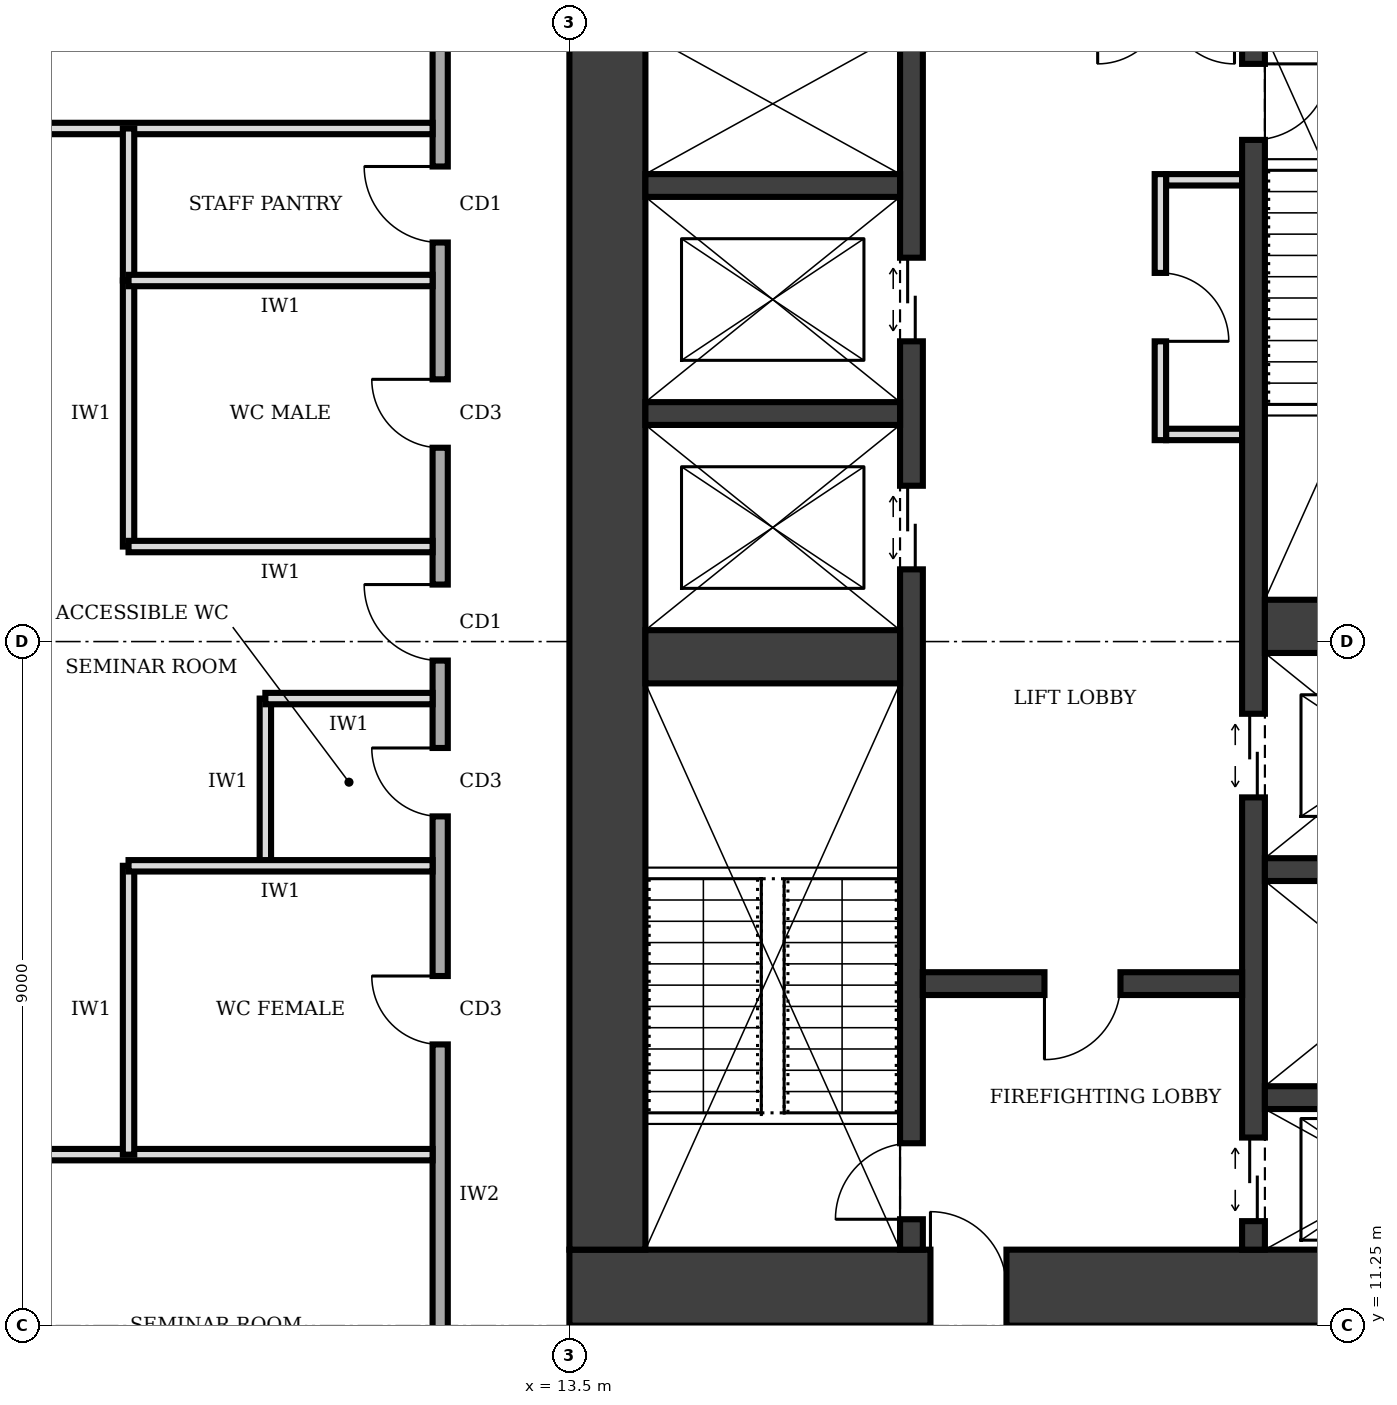
"""IFC4 building model, lengths in metres.
Left out: names, types, materials, properties, quantities, classifications, styles, units other than length and angle.
Written with IfcOpenShell. Run it as: python <this file> out.ifc"""

import sys

from ifc_helpers import new_model, si_unit, direction, frame, frame_2d, origin, place, context, subcontext, project, spatial, rectangle, extrude, element, fill, save


model = new_model("IFC4")
c1 = context("Model", 3, precision=1e-05, world=origin(), true_north=direction((0.0, 1.0)))
c2 = subcontext(c1, "Body", "Model", "MODEL_VIEW")
j1 = project(units=[si_unit("LENGTHUNIT", "METRE"), si_unit("PLANEANGLEUNIT", "RADIAN")], contexts=[c1])
p1 = place(None, origin())
s1 = spatial("IfcSite", under=j1, at=p1, CompositionType="ELEMENT")
p2 = place(p1, origin())
s2 = spatial("IfcBuilding", under=s1, at=p2, CompositionType="ELEMENT")
p3 = place(p2, frame((0.0, 0.0, 33.0)))
s3 = spatial("IfcBuildingStorey", under=s2, at=p3, CompositionType="ELEMENT", Elevation=33.0)
p4 = place(p3, frame((13.5, 11.75, 0.0), z_axis=(0.0, 0.0, 1.0), x_axis=(1.0, 0.0, 0.0)))
e1 = element("IfcWall", 1, at=p4, inside=s3, PredefinedType="SHEAR", context=c2, shape_type="SweptSolid", body=[
    extrude(rectangle(XDim=13.5, YDim=1.0, at=frame_2d((6.75, 0.0))), origin(), (0.0, 0.0, 1.0), 4.0),
])
p5 = place(p4, frame((4.75, 0.0, 0.0)))
e2 = element("IfcOpeningElement", 2, at=p5, cuts=e1, PredefinedType="OPENING", context=c2, shape_type="SweptSolid", body=[
    extrude(rectangle(XDim=1.0, YDim=2.1, at=frame_2d((0.5, 1.05))), frame((0.0, 0.51, 0.0), z_axis=(0.0, -1.0, 0.0), x_axis=(1.0, 0.0, 0.0)), (0.0, 0.0, 1.0), 1.02),
])
p6 = place(p3, frame((14.0, 28.25, 0.0), z_axis=(0.0, 0.0, 1.0), x_axis=(0.0, -1.0, 0.0)))
e3 = element("IfcWall", 3, at=p6, inside=s3, PredefinedType="SHEAR", context=c2, shape_type="SweptSolid", body=[
    extrude(rectangle(XDim=16.0, YDim=1.0, at=frame_2d((8.0, 0.0))), origin(), (0.0, 0.0, 1.0), 4.0),
])
p7 = place(p3, frame((18.0, 12.25, 0.0), z_axis=(0.0, 0.0, 1.0), x_axis=(0.0, 1.0, 0.0)))
e4 = element("IfcWall", 4, at=p7, inside=s3, PredefinedType="SHEAR", context=c2, shape_type="SweptSolid", body=[
    extrude(rectangle(XDim=16.0, YDim=0.3, at=frame_2d((8.0, 0.0))), origin(), (0.0, 0.0, 1.0), 4.0),
])
p8 = place(p7, frame((0.4, 0.0, 0.0)))
e5 = element("IfcOpeningElement", 5, at=p8, cuts=e4, PredefinedType="OPENING", context=c2, shape_type="SweptSolid", body=[
    extrude(rectangle(XDim=1.0, YDim=2.1, at=frame_2d((0.5, 1.05))), frame((0.0, 0.16, 0.0), z_axis=(0.0, -1.0, 0.0), x_axis=(1.0, 0.0, 0.0)), (0.0, 0.0, 1.0), 0.32),
])
p9 = place(p7, frame((8.95, 0.0, 0.0)))
e6 = element("IfcOpeningElement", 6, at=p9, cuts=e4, PredefinedType="OPENING", context=c2, shape_type="SweptSolid", body=[
    extrude(rectangle(XDim=1.1, YDim=2.1, at=frame_2d((0.55, 1.05))), frame((0.0, 0.16, 0.0), z_axis=(0.0, -1.0, 0.0), x_axis=(1.0, 0.0, 0.0)), (0.0, 0.0, 1.0), 0.32),
])
p10 = place(p7, frame((11.95, 0.0, 0.0)))
e7 = element("IfcOpeningElement", 7, at=p10, cuts=e4, PredefinedType="OPENING", context=c2, shape_type="SweptSolid", body=[
    extrude(rectangle(XDim=1.1, YDim=2.1, at=frame_2d((0.55, 1.05))), frame((0.0, 0.16, 0.0), z_axis=(0.0, -1.0, 0.0), x_axis=(1.0, 0.0, 0.0)), (0.0, 0.0, 1.0), 0.32),
])
p11 = place(p3, frame((22.5, 12.25, 0.0), z_axis=(0.0, 0.0, 1.0), x_axis=(0.0, 1.0, 0.0)))
e8 = element("IfcWall", 8, at=p11, inside=s3, PredefinedType="SHEAR", context=c2, shape_type="SweptSolid", body=[
    extrude(rectangle(XDim=16.0, YDim=0.3, at=frame_2d((8.0, 0.0))), origin(), (0.0, 0.0, 1.0), 4.0),
])
p12 = place(p11, frame((14.6, 0.0, 0.0)))
e9 = element("IfcOpeningElement", 9, at=p12, cuts=e8, PredefinedType="OPENING", context=c2, shape_type="SweptSolid", body=[
    extrude(rectangle(XDim=1.0, YDim=2.1, at=frame_2d((0.5, 1.05))), frame((0.0, 0.16, 0.0), z_axis=(0.0, -1.0, 0.0), x_axis=(1.0, 0.0, 0.0)), (0.0, 0.0, 1.0), 0.32),
])
p13 = place(p11, frame((0.375, 0.0, 0.0)))
e10 = element("IfcOpeningElement", 10, at=p13, cuts=e8, PredefinedType="OPENING", context=c2, shape_type="SweptSolid", body=[
    extrude(rectangle(XDim=1.1, YDim=2.1, at=frame_2d((0.55, 1.05))), frame((0.0, 0.16, 0.0), z_axis=(0.0, -1.0, 0.0), x_axis=(1.0, 0.0, 0.0)), (0.0, 0.0, 1.0), 0.32),
])
p14 = place(p11, frame((5.95, 0.0, 0.0)))
e11 = element("IfcOpeningElement", 11, at=p14, cuts=e8, PredefinedType="OPENING", context=c2, shape_type="SweptSolid", body=[
    extrude(rectangle(XDim=1.1, YDim=2.1, at=frame_2d((0.55, 1.05))), frame((0.0, 0.16, 0.0), z_axis=(0.0, -1.0, 0.0), x_axis=(1.0, 0.0, 0.0)), (0.0, 0.0, 1.0), 0.32),
])
p15 = place(p3, frame((14.5, 20.05, 0.0), z_axis=(0.0, 0.0, 1.0), x_axis=(1.0, 0.0, 0.0)))
e12 = element("IfcWall", 12, at=p15, inside=s3, PredefinedType="SHEAR", context=c2, shape_type="SweptSolid", body=[
    extrude(rectangle(XDim=3.35, YDim=0.7, at=frame_2d((1.675, 0.0))), origin(), (0.0, 0.0, 1.0), 4.0),
])
p16 = place(p3, frame((18.15, 15.75, 0.0), z_axis=(0.0, 0.0, 1.0), x_axis=(1.0, 0.0, 0.0)))
e13 = element("IfcWall", 13, at=p16, inside=s3, PredefinedType="SHEAR", context=c2, shape_type="SweptSolid", body=[
    extrude(rectangle(XDim=4.2, YDim=0.3, at=frame_2d((2.1, 0.0))), origin(), (0.0, 0.0, 1.0), 4.0),
])
p17 = place(p16, frame((1.6, 0.0, 0.0)))
e14 = element("IfcOpeningElement", 14, at=p17, cuts=e13, PredefinedType="OPENING", context=c2, shape_type="SweptSolid", body=[
    extrude(rectangle(XDim=1.0, YDim=2.1, at=frame_2d((0.5, 1.05))), frame((0.0, 0.16, 0.0), z_axis=(0.0, -1.0, 0.0), x_axis=(1.0, 0.0, 0.0)), (0.0, 0.0, 1.0), 0.32),
])
for number, where, z_axis, x_axis in (
    (15, (22.65, 14.25, 0.0), (0.0, 0.0, 1.0), (1.0, 0.0, 0.0)),
    (16, (22.65, 17.25, 0.0), (0.0, 0.0, 1.0), (1.0, 0.0, 0.0)),
):
    element("IfcWall", number, at=place(p3, frame(where, z_axis=z_axis, x_axis=x_axis)), inside=s3, PredefinedType="SHEAR", context=c2, shape_type="SweptSolid", body=[
        extrude(rectangle(XDim=3.35, YDim=0.3, at=frame_2d((1.675, 0.0))), origin(), (0.0, 0.0, 1.0), 4.0),
    ])
p18 = place(p3, frame((22.65, 20.45, 0.0), z_axis=(0.0, 0.0, 1.0), x_axis=(1.0, 0.0, 0.0)))
e17 = element("IfcWall", 17, at=p18, inside=s3, PredefinedType="SHEAR", context=c2, shape_type="SweptSolid", body=[
    extrude(rectangle(XDim=3.35, YDim=0.7, at=frame_2d((1.675, 0.0))), origin(), (0.0, 0.0, 1.0), 4.0),
])
for number, where, z_axis, x_axis in (
    (18, (14.5, 23.25, 0.0), (0.0, 0.0, 1.0), (1.0, 0.0, 0.0)),
    (19, (14.5, 26.25, 0.0), (0.0, 0.0, 1.0), (1.0, 0.0, 0.0)),
):
    element("IfcWall", number, at=place(p3, frame(where, z_axis=z_axis, x_axis=x_axis)), inside=s3, PredefinedType="SHEAR", context=c2, shape_type="SweptSolid", body=[
        extrude(rectangle(XDim=3.35, YDim=0.3, at=frame_2d((1.675, 0.0))), origin(), (0.0, 0.0, 1.0), 4.0),
    ])
p19 = place(p3, frame((21.275, 22.9, 0.0), z_axis=(0.0, 0.0, 1.0), x_axis=(0.0, 1.0, 0.0)))
e20 = element("IfcWall", 20, at=p19, inside=s3, PredefinedType="PARTITIONING", context=c2, shape_type="SweptSolid", body=[
    extrude(rectangle(XDim=3.5, YDim=0.15, at=frame_2d((1.75, 0.0))), origin(), (0.0, 0.0, 1.0), 3.75),
])
p20 = place(p19, frame((1.3, 0.0, 0.0)))
e21 = element("IfcOpeningElement", 21, at=p20, cuts=e20, PredefinedType="OPENING", context=c2, shape_type="SweptSolid", body=[
    extrude(rectangle(XDim=0.9, YDim=2.1, at=frame_2d((0.45, 1.05))), frame((0.0, 0.085, 0.0), z_axis=(0.0, -1.0, 0.0), x_axis=(1.0, 0.0, 0.0)), (0.0, 0.0, 1.0), 0.17),
])
for number, where, z_axis, x_axis in (
    (22, (21.35, 22.975, 0.0), (0.0, 0.0, 1.0), (1.0, 0.0, 0.0)),
    (23, (21.35, 26.325, 0.0), (0.0, 0.0, 1.0), (1.0, 0.0, 0.0)),
):
    element("IfcWall", number, at=place(p3, frame(where, z_axis=z_axis, x_axis=x_axis)), inside=s3, PredefinedType="PARTITIONING", context=c2, shape_type="SweptSolid", body=[
        extrude(rectangle(XDim=1.0, YDim=0.15, at=frame_2d((0.5, 0.0))), origin(), (0.0, 0.0, 1.0), 3.75),
    ])
p21 = place(p3, frame((11.8, 31.3, 0.0), z_axis=(0.0, 0.0, 1.0), x_axis=(0.0, -1.0, 0.0)))
e24 = element("IfcWall", 24, at=p21, inside=s3, PredefinedType="SOLIDWALL", context=c2, shape_type="SweptSolid", body=[
    extrude(rectangle(XDim=23.8, YDim=0.2, at=frame_2d((11.9, 0.0))), origin(), (0.0, 0.0, 1.0), 3.75),
])
p22 = place(p21, frame((20.3, 0.0, 0.0)))
e25 = element("IfcOpeningElement", 25, at=p22, cuts=e24, PredefinedType="OPENING", context=c2, shape_type="SweptSolid", body=[
    extrude(rectangle(XDim=1.0, YDim=2.1, at=frame_2d((0.5, 1.05))), frame((0.0, 0.11, 0.0), z_axis=(0.0, -1.0, 0.0), x_axis=(1.0, 0.0, 0.0)), (0.0, 0.0, 1.0), 0.22),
])
p23 = place(p21, frame((15.45, 0.0, 0.0)))
e26 = element("IfcOpeningElement", 26, at=p23, cuts=e24, PredefinedType="OPENING", context=c2, shape_type="SweptSolid", body=[
    extrude(rectangle(XDim=0.9, YDim=2.1, at=frame_2d((0.45, 1.05))), frame((0.0, 0.11, 0.0), z_axis=(0.0, -1.0, 0.0), x_axis=(1.0, 0.0, 0.0)), (0.0, 0.0, 1.0), 0.22),
])
p24 = place(p21, frame((12.45, 0.0, 0.0)))
e27 = element("IfcOpeningElement", 27, at=p24, cuts=e24, PredefinedType="OPENING", context=c2, shape_type="SweptSolid", body=[
    extrude(rectangle(XDim=0.9, YDim=2.1, at=frame_2d((0.45, 1.05))), frame((0.0, 0.11, 0.0), z_axis=(0.0, -1.0, 0.0), x_axis=(1.0, 0.0, 0.0)), (0.0, 0.0, 1.0), 0.22),
])
p25 = place(p21, frame((7.6, 0.0, 0.0)))
e28 = element("IfcOpeningElement", 28, at=p25, cuts=e24, PredefinedType="OPENING", context=c2, shape_type="SweptSolid", body=[
    extrude(rectangle(XDim=0.9, YDim=2.1, at=frame_2d((0.45, 1.05))), frame((0.0, 0.11, 0.0), z_axis=(0.0, -1.0, 0.0), x_axis=(1.0, 0.0, 0.0)), (0.0, 0.0, 1.0), 0.22),
])
p26 = place(p21, frame((4.8, 0.0, 0.0)))
e29 = element("IfcOpeningElement", 29, at=p26, cuts=e24, PredefinedType="OPENING", context=c2, shape_type="SweptSolid", body=[
    extrude(rectangle(XDim=1.0, YDim=2.1, at=frame_2d((0.5, 1.05))), frame((0.0, 0.11, 0.0), z_axis=(0.0, -1.0, 0.0), x_axis=(1.0, 0.0, 0.0)), (0.0, 0.0, 1.0), 0.22),
])
p27 = place(p21, frame((10.3, 0.0, 0.0)))
e30 = element("IfcOpeningElement", 30, at=p27, cuts=e24, PredefinedType="OPENING", context=c2, shape_type="SweptSolid", body=[
    extrude(rectangle(XDim=1.0, YDim=2.1, at=frame_2d((0.5, 1.05))), frame((0.0, 0.11, 0.0), z_axis=(0.0, -1.0, 0.0), x_axis=(1.0, 0.0, 0.0)), (0.0, 0.0, 1.0), 0.22),
])
p28 = place(p21, frame((1.55, 0.0, 0.0)))
e31 = element("IfcOpeningElement", 31, at=p28, cuts=e24, PredefinedType="OPENING", context=c2, shape_type="SweptSolid", body=[
    extrude(rectangle(XDim=1.0, YDim=2.1, at=frame_2d((0.5, 1.05))), frame((0.0, 0.11, 0.0), z_axis=(0.0, -1.0, 0.0), x_axis=(1.0, 0.0, 0.0)), (0.0, 0.0, 1.0), 0.22),
])
for number, where, z_axis, x_axis in (
    (32, (0.3, 13.5, 0.0), (0.0, 0.0, 1.0), (1.0, 0.0, 0.0)),
    (33, (0.3, 27.0, 0.0), (0.0, 0.0, 1.0), (1.0, 0.0, 0.0)),
):
    element("IfcWall", number, at=place(p3, frame(where, z_axis=z_axis, x_axis=x_axis)), inside=s3, PredefinedType="PARTITIONING", context=c2, shape_type="SweptSolid", body=[
        extrude(rectangle(XDim=11.4, YDim=0.15, at=frame_2d((5.7, 0.0))), origin(), (0.0, 0.0, 1.0), 3.75),
    ])
p29 = place(p3, frame((11.7, 17.3, 0.0), z_axis=(0.0, 0.0, 1.0), x_axis=(-1.0, 0.0, 0.0)))
e34 = element("IfcWall", 34, at=p29, inside=s3, PredefinedType="PARTITIONING", context=c2, shape_type="SweptSolid", body=[
    extrude(rectangle(XDim=4.0, YDim=0.15, at=frame_2d((2.0, 0.0))), origin(), (0.0, 0.0, 1.0), 3.75),
])
p30 = place(p3, frame((11.7, 19.5, 0.0), z_axis=(0.0, 0.0, 1.0), x_axis=(-1.0, 0.0, 0.0)))
e35 = element("IfcWall", 35, at=p30, inside=s3, PredefinedType="PARTITIONING", context=c2, shape_type="SweptSolid", body=[
    extrude(rectangle(XDim=2.2, YDim=0.15, at=frame_2d((1.1, 0.0))), origin(), (0.0, 0.0, 1.0), 2.85),
])
for number, where, z_axis, x_axis in (
    (36, (11.7, 21.5, 0.0), (0.0, 0.0, 1.0), (-1.0, 0.0, 0.0)),
    (37, (11.7, 25.0, 0.0), (0.0, 0.0, 1.0), (-1.0, 0.0, 0.0)),
):
    element("IfcWall", number, at=place(p3, frame(where, z_axis=z_axis, x_axis=x_axis)), inside=s3, PredefinedType="PARTITIONING", context=c2, shape_type="SweptSolid", body=[
        extrude(rectangle(XDim=4.0, YDim=0.15, at=frame_2d((2.0, 0.0))), origin(), (0.0, 0.0, 1.0), 3.75),
    ])
p31 = place(p3, frame((7.7, 13.5, 0.0), z_axis=(0.0, 0.0, 1.0), x_axis=(0.0, 1.0, 0.0)))
e38 = element("IfcWall", 38, at=p31, inside=s3, PredefinedType="PARTITIONING", context=c2, shape_type="SweptSolid", body=[
    extrude(rectangle(XDim=3.8, YDim=0.15, at=frame_2d((1.9, 0.0))), origin(), (0.0, 0.0, 1.0), 3.75),
])
p32 = place(p3, frame((9.5, 17.3, 0.0), z_axis=(0.0, 0.0, 1.0), x_axis=(0.0, 1.0, 0.0)))
e39 = element("IfcWall", 39, at=p32, inside=s3, PredefinedType="PARTITIONING", context=c2, shape_type="SweptSolid", body=[
    extrude(rectangle(XDim=2.2, YDim=0.15, at=frame_2d((1.1, 0.0))), origin(), (0.0, 0.0, 1.0), 3.75),
])
p33 = place(p3, frame((7.7, 21.5, 0.0), z_axis=(0.0, 0.0, 1.0), x_axis=(0.0, 1.0, 0.0)))
e40 = element("IfcWall", 40, at=p33, inside=s3, PredefinedType="PARTITIONING", context=c2, shape_type="SweptSolid", body=[
    extrude(rectangle(XDim=3.5, YDim=0.15, at=frame_2d((1.75, 0.0))), origin(), (0.0, 0.0, 1.0), 3.75),
])
p34 = place(p3, frame((7.7, 25.0, 0.0), z_axis=(0.0, 0.0, 1.0), x_axis=(0.0, 1.0, 0.0)))
e41 = element("IfcWall", 41, at=p34, inside=s3, PredefinedType="PARTITIONING", context=c2, shape_type="SweptSolid", body=[
    extrude(rectangle(XDim=2.0, YDim=0.15, at=frame_2d((1.0, 0.0))), origin(), (0.0, 0.0, 1.0), 3.75),
])
p35 = place(p5, origin())
e42 = element("IfcDoor", 42, at=p35, inside=s3, OperationType="SINGLE_SWING_LEFT", PredefinedType="DOOR", context=c2, shape_type="SweptSolid", body=[
    extrude(rectangle(XDim=1.0, YDim=2.1, at=frame_2d((0.5, 1.05))), frame((0.0, 0.025, 0.0), z_axis=(0.0, -1.0, 0.0), x_axis=(1.0, 0.0, 0.0)), (0.0, 0.0, 1.0), 0.05),
])
fill(e2, e42)
p36 = place(p17, frame((1.0, 0.0, 0.0), z_axis=(0.0, 0.0, 1.0), x_axis=(-1.0, 0.0, 0.0)))
e43 = element("IfcDoor", 43, at=p36, inside=s3, OperationType="SINGLE_SWING_RIGHT", PredefinedType="DOOR", context=c2, shape_type="SweptSolid", body=[
    extrude(rectangle(XDim=1.0, YDim=2.1, at=frame_2d((0.5, 1.05))), frame((0.0, 0.025, 0.0), z_axis=(0.0, -1.0, 0.0), x_axis=(1.0, 0.0, 0.0)), (0.0, 0.0, 1.0), 0.05),
])
fill(e14, e43)
p37 = place(p8, origin())
e44 = element("IfcDoor", 44, at=p37, inside=s3, OperationType="SINGLE_SWING_LEFT", PredefinedType="DOOR", context=c2, shape_type="SweptSolid", body=[
    extrude(rectangle(XDim=1.0, YDim=2.1, at=frame_2d((0.5, 1.05))), frame((0.0, 0.025, 0.0), z_axis=(0.0, -1.0, 0.0), x_axis=(1.0, 0.0, 0.0)), (0.0, 0.0, 1.0), 0.05),
])
fill(e5, e44)
p38 = place(p12, frame((1.0, 0.0, 0.0), z_axis=(0.0, 0.0, 1.0), x_axis=(-1.0, 0.0, 0.0)))
e45 = element("IfcDoor", 45, at=p38, inside=s3, OperationType="SINGLE_SWING_LEFT", PredefinedType="DOOR", context=c2, shape_type="SweptSolid", body=[
    extrude(rectangle(XDim=1.0, YDim=2.1, at=frame_2d((0.5, 1.05))), frame((0.0, 0.025, 0.0), z_axis=(0.0, -1.0, 0.0), x_axis=(1.0, 0.0, 0.0)), (0.0, 0.0, 1.0), 0.05),
])
fill(e9, e45)
p39 = place(p13, origin())
e46 = element("IfcDoor", 46, at=p39, inside=s3, OperationType="DOUBLE_DOOR_SLIDING", PredefinedType="DOOR", context=c2, shape_type="SweptSolid", body=[
    extrude(rectangle(XDim=1.1, YDim=2.1, at=frame_2d((0.55, 1.05))), frame((0.0, 0.025, 0.0), z_axis=(0.0, -1.0, 0.0), x_axis=(1.0, 0.0, 0.0)), (0.0, 0.0, 1.0), 0.05),
])
fill(e10, e46)
p40 = place(p9, origin())
e47 = element("IfcDoor", 47, at=p40, inside=s3, OperationType="DOUBLE_DOOR_SLIDING", PredefinedType="DOOR", context=c2, shape_type="SweptSolid", body=[
    extrude(rectangle(XDim=1.1, YDim=2.1, at=frame_2d((0.55, 1.05))), frame((0.0, 0.025, 0.0), z_axis=(0.0, -1.0, 0.0), x_axis=(1.0, 0.0, 0.0)), (0.0, 0.0, 1.0), 0.05),
])
fill(e6, e47)
p41 = place(p10, origin())
e48 = element("IfcDoor", 48, at=p41, inside=s3, OperationType="DOUBLE_DOOR_SLIDING", PredefinedType="DOOR", context=c2, shape_type="SweptSolid", body=[
    extrude(rectangle(XDim=1.1, YDim=2.1, at=frame_2d((0.55, 1.05))), frame((0.0, 0.025, 0.0), z_axis=(0.0, -1.0, 0.0), x_axis=(1.0, 0.0, 0.0)), (0.0, 0.0, 1.0), 0.05),
])
fill(e7, e48)
p42 = place(p14, origin())
e49 = element("IfcDoor", 49, at=p42, inside=s3, OperationType="DOUBLE_DOOR_SLIDING", PredefinedType="DOOR", context=c2, shape_type="SweptSolid", body=[
    extrude(rectangle(XDim=1.1, YDim=2.1, at=frame_2d((0.55, 1.05))), frame((0.0, 0.025, 0.0), z_axis=(0.0, -1.0, 0.0), x_axis=(1.0, 0.0, 0.0)), (0.0, 0.0, 1.0), 0.05),
])
fill(e11, e49)
p43 = place(p20, frame((0.9, 0.0, 0.0), z_axis=(0.0, 0.0, 1.0), x_axis=(-1.0, 0.0, 0.0)))
e50 = element("IfcDoor", 50, at=p43, inside=s3, OperationType="SINGLE_SWING_RIGHT", PredefinedType="DOOR", context=c2, shape_type="SweptSolid", body=[
    extrude(rectangle(XDim=0.9, YDim=2.1, at=frame_2d((0.45, 1.05))), frame((0.0, 0.025, 0.0), z_axis=(0.0, -1.0, 0.0), x_axis=(1.0, 0.0, 0.0)), (0.0, 0.0, 1.0), 0.05),
])
fill(e21, e50)
p44 = place(p23, frame((0.9, 0.0, 0.0), z_axis=(0.0, 0.0, 1.0), x_axis=(-1.0, 0.0, 0.0)))
e51 = element("IfcDoor", 51, at=p44, inside=s3, OperationType="SINGLE_SWING_RIGHT", PredefinedType="DOOR", context=c2, shape_type="SweptSolid", body=[
    extrude(rectangle(XDim=0.9, YDim=2.1, at=frame_2d((0.45, 1.05))), frame((0.0, 0.025, 0.0), z_axis=(0.0, -1.0, 0.0), x_axis=(1.0, 0.0, 0.0)), (0.0, 0.0, 1.0), 0.05),
])
fill(e26, e51)
p45 = place(p24, frame((0.9, 0.0, 0.0), z_axis=(0.0, 0.0, 1.0), x_axis=(-1.0, 0.0, 0.0)))
e52 = element("IfcDoor", 52, at=p45, inside=s3, OperationType="SINGLE_SWING_RIGHT", PredefinedType="DOOR", context=c2, shape_type="SweptSolid", body=[
    extrude(rectangle(XDim=0.9, YDim=2.1, at=frame_2d((0.45, 1.05))), frame((0.0, 0.025, 0.0), z_axis=(0.0, -1.0, 0.0), x_axis=(1.0, 0.0, 0.0)), (0.0, 0.0, 1.0), 0.05),
])
fill(e27, e52)
p46 = place(p25, frame((0.9, 0.0, 0.0), z_axis=(0.0, 0.0, 1.0), x_axis=(-1.0, 0.0, 0.0)))
e53 = element("IfcDoor", 53, at=p46, inside=s3, OperationType="SINGLE_SWING_RIGHT", PredefinedType="DOOR", context=c2, shape_type="SweptSolid", body=[
    extrude(rectangle(XDim=0.9, YDim=2.1, at=frame_2d((0.45, 1.05))), frame((0.0, 0.025, 0.0), z_axis=(0.0, -1.0, 0.0), x_axis=(1.0, 0.0, 0.0)), (0.0, 0.0, 1.0), 0.05),
])
fill(e28, e53)
p47 = place(p26, frame((1.0, 0.0, 0.0), z_axis=(0.0, 0.0, 1.0), x_axis=(-1.0, 0.0, 0.0)))
e54 = element("IfcDoor", 54, at=p47, inside=s3, OperationType="SINGLE_SWING_RIGHT", PredefinedType="DOOR", context=c2, shape_type="SweptSolid", body=[
    extrude(rectangle(XDim=1.0, YDim=2.1, at=frame_2d((0.5, 1.05))), frame((0.0, 0.025, 0.0), z_axis=(0.0, -1.0, 0.0), x_axis=(1.0, 0.0, 0.0)), (0.0, 0.0, 1.0), 0.05),
])
fill(e29, e54)
p48 = place(p27, frame((1.0, 0.0, 0.0), z_axis=(0.0, 0.0, 1.0), x_axis=(-1.0, 0.0, 0.0)))
e55 = element("IfcDoor", 55, at=p48, inside=s3, OperationType="SINGLE_SWING_RIGHT", PredefinedType="DOOR", context=c2, shape_type="SweptSolid", body=[
    extrude(rectangle(XDim=1.0, YDim=2.1, at=frame_2d((0.5, 1.05))), frame((0.0, 0.025, 0.0), z_axis=(0.0, -1.0, 0.0), x_axis=(1.0, 0.0, 0.0)), (0.0, 0.0, 1.0), 0.05),
])
fill(e30, e55)
save(model, sys.argv[1])
